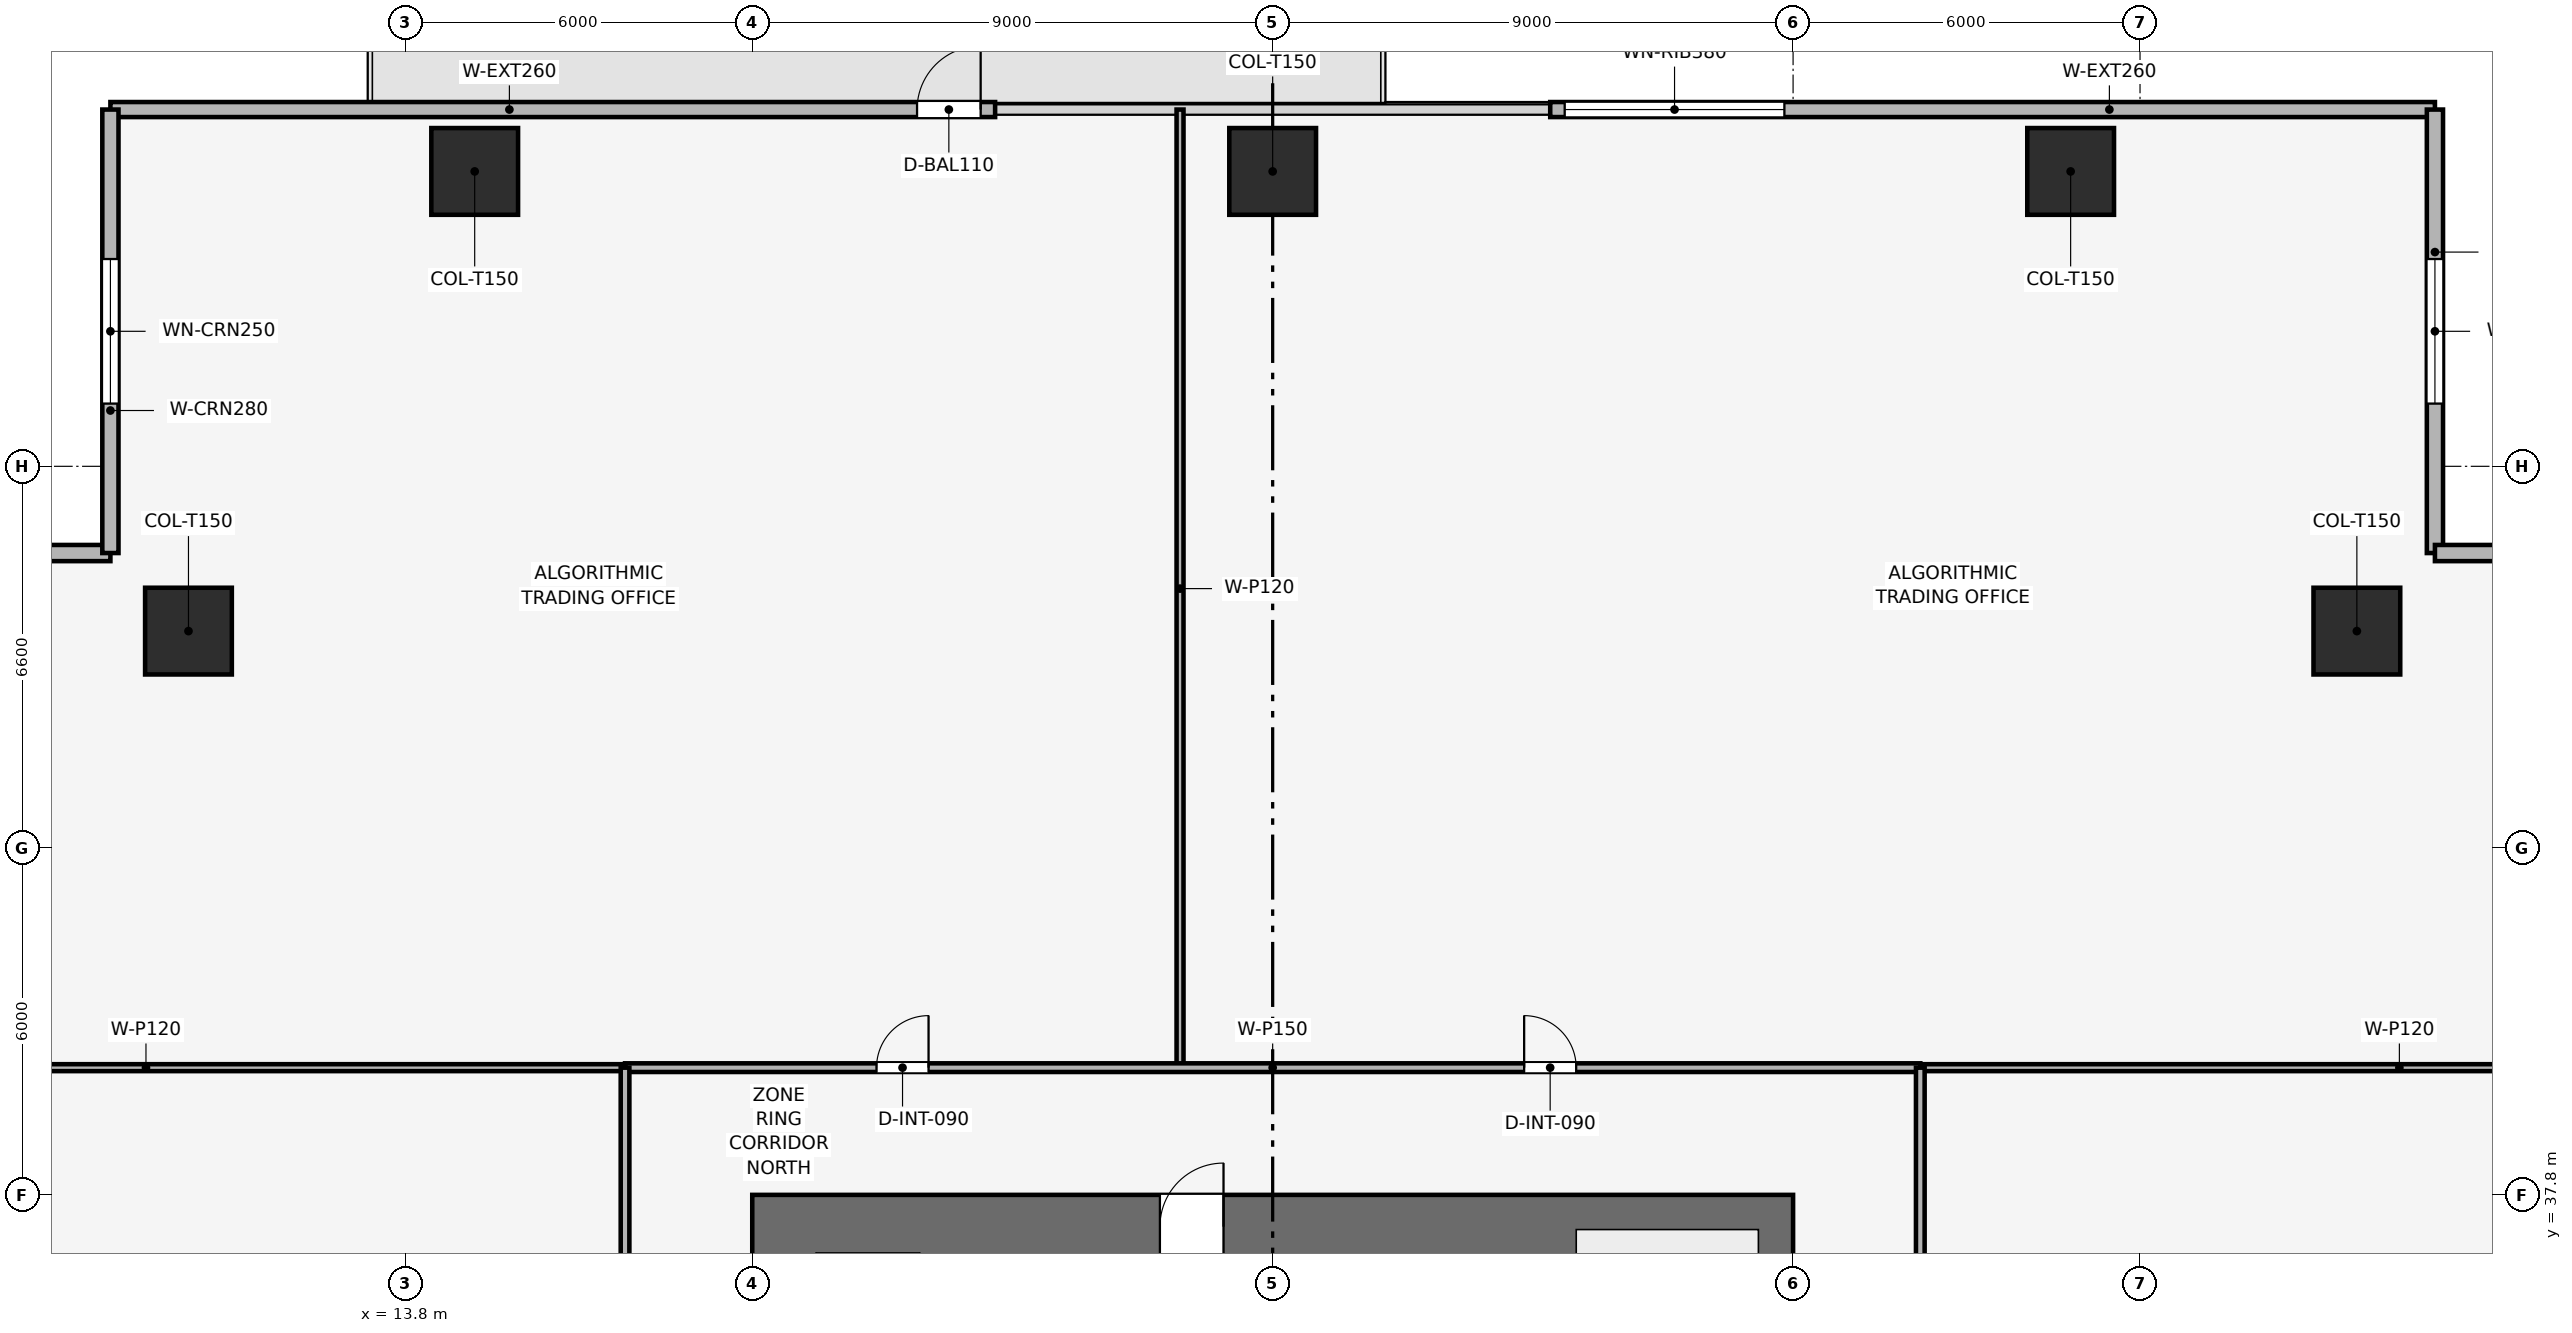
"""IFC4 building model, lengths in metres.
Left out: names, types, materials, properties, quantities, classifications, styles, units other than length and angle.
Written with IfcOpenShell. Run it as: python <this file> out.ifc"""

import sys

from ifc_helpers import new_model, si_unit, direction, frame, frame_2d, origin, origin_2d, place, context, subcontext, project, spatial, rectangle, extrude, element, fill, save


model = new_model("IFC4")
c1 = context("Model", 3, precision=1e-05, world=origin(), true_north=direction((0.0, 1.0)))
c2 = subcontext(c1, "Body", "Model", "MODEL_VIEW")
j1 = project(units=[si_unit("LENGTHUNIT", "METRE"), si_unit("PLANEANGLEUNIT", "RADIAN")], contexts=[c1])
p1 = place(None, origin())
s1 = spatial("IfcSite", under=j1, at=p1, CompositionType="ELEMENT")
p2 = place(p1, origin())
s2 = spatial("IfcBuilding", under=s1, at=p2, CompositionType="ELEMENT")
p3 = place(p2, frame((0.0, 0.0, 57.3)))
s3 = spatial("IfcBuildingStorey", under=s2, at=p3, CompositionType="ELEMENT", Elevation=57.3)
p4 = place(p3, frame((19.8, 37.25, 0.0), z_axis=(0.0, 0.0, 1.0), x_axis=(1.0, 0.0, 0.0)))
e1 = element("IfcWall", 1, at=p4, inside=s3, PredefinedType="SHEAR", context=c2, shape_type="SweptSolid", body=[
    extrude(rectangle(XDim=18.0, YDim=1.1, at=frame_2d((9.0, 0.0))), origin(), (0.0, 0.0, 1.0), 3.9),
])
p5 = place(p4, frame((7.05, 0.0, 0.0)))
e2 = element("IfcOpeningElement", 2, at=p5, cuts=e1, PredefinedType="OPENING", context=c2, shape_type="SweptSolid", body=[
    extrude(rectangle(XDim=1.1, YDim=2.15, at=frame_2d((0.55, 1.075))), frame((0.0, 0.56, 0.0), z_axis=(0.0, -1.0, 0.0), x_axis=(1.0, 0.0, 0.0)), (0.0, 0.0, 1.0), 1.12),
])
for number, where, z_axis, x_axis in (
    (3, (42.6, 55.5, 0.003), (0.0, 0.0, 1.0), (1.0, 0.0, 0.0)),
    (4, (28.8, 55.5, 0.003), (0.0, 0.0, 1.0), (1.0, 0.0, 0.0)),
    (5, (15.0, 55.5, 0.003), (0.0, 0.0, 1.0), (1.0, 0.0, 0.0)),
    (6, (47.55, 47.55, 0.003), (0.0, 0.0, 1.0), (1.0, 0.0, 0.0)),
    (7, (10.05, 47.55, 0.003), (0.0, 0.0, 1.0), (1.0, 0.0, 0.0)),
):
    element("IfcColumn", number, at=place(p3, frame(where, z_axis=z_axis, x_axis=x_axis)), inside=s3, PredefinedType="COLUMN", context=c2, shape_type="SweptSolid", body=[
        extrude(rectangle(XDim=1.5, YDim=1.5, at=origin_2d()), origin(), (0.0, 0.0, 1.0), 3.644),
    ])
p6 = place(p3, frame((8.7, 56.57, 0.0), z_axis=(0.0, 0.0, 1.0), x_axis=(1.0, 0.0, 0.0)))
e8 = element("IfcWall", 8, at=p6, inside=s3, PredefinedType="SOLIDWALL", context=c2, shape_type="SweptSolid", body=[
    extrude(rectangle(XDim=15.3, YDim=0.26, at=frame_2d((7.65, 0.0))), origin(), (0.0, 0.0, 1.0), 3.65),
])
p7 = place(p6, frame((13.95, 0.0, 0.0)))
e9 = element("IfcOpeningElement", 9, at=p7, cuts=e8, PredefinedType="OPENING", context=c2, shape_type="SweptSolid", body=[
    extrude(rectangle(XDim=1.1, YDim=2.2, at=frame_2d((0.55, 1.1))), frame((0.0, 0.14, 0.0), z_axis=(0.0, -1.0, 0.0), x_axis=(1.0, 0.0, 0.0)), (0.0, 0.0, 1.0), 0.28),
])
p8 = place(p3, frame((33.6, 56.57, 0.0), z_axis=(0.0, 0.0, 1.0), x_axis=(1.0, 0.0, 0.0)))
e10 = element("IfcWall", 10, at=p8, inside=s3, PredefinedType="SOLIDWALL", context=c2, shape_type="SweptSolid", body=[
    extrude(rectangle(XDim=15.3, YDim=0.26, at=frame_2d((7.65, 0.0))), origin(), (0.0, 0.0, 1.0), 3.65),
])
p9 = place(p8, frame((0.25, 0.0, 0.9)))
e11 = element("IfcOpeningElement", 11, at=p9, cuts=e10, PredefinedType="OPENING", context=c2, shape_type="SweptSolid", body=[
    extrude(rectangle(XDim=3.8, YDim=1.9, at=frame_2d((1.9, 0.95))), frame((0.0, 0.14, 0.0), z_axis=(0.0, -1.0, 0.0), x_axis=(1.0, 0.0, 0.0)), (0.0, 0.0, 1.0), 0.28),
])
p10 = place(p3, frame((1.03, 48.9, 0.0), z_axis=(0.0, 0.0, 1.0), x_axis=(1.0, 0.0, 0.0)))
e12 = element("IfcWall", 12, at=p10, inside=s3, PredefinedType="SOLIDWALL", context=c2, shape_type="SweptSolid", body=[
    extrude(rectangle(XDim=7.67, YDim=0.28, at=frame_2d((3.835, 0.0))), origin(), (0.0, 0.0, 1.0), 3.65),
])
p11 = place(p10, frame((2.585, 0.0, 0.9)))
e13 = element("IfcOpeningElement", 13, at=p11, cuts=e12, PredefinedType="OPENING", context=c2, shape_type="SweptSolid", body=[
    extrude(rectangle(XDim=2.5, YDim=1.9, at=frame_2d((1.25, 0.95))), frame((0.0, 0.15, 0.0), z_axis=(0.0, -1.0, 0.0), x_axis=(1.0, 0.0, 0.0)), (0.0, 0.0, 1.0), 0.3),
])
p12 = place(p3, frame((8.7, 48.9, 0.0), z_axis=(0.0, 0.0, 1.0), x_axis=(0.0, 1.0, 0.0)))
e14 = element("IfcWall", 14, at=p12, inside=s3, PredefinedType="SOLIDWALL", context=c2, shape_type="SweptSolid", body=[
    extrude(rectangle(XDim=7.67, YDim=0.28, at=frame_2d((3.835, 0.0))), origin(), (0.0, 0.0, 1.0), 3.65),
])
p13 = place(p12, frame((2.585, 0.0, 0.9)))
e15 = element("IfcOpeningElement", 15, at=p13, cuts=e14, PredefinedType="OPENING", context=c2, shape_type="SweptSolid", body=[
    extrude(rectangle(XDim=2.5, YDim=1.9, at=frame_2d((1.25, 0.95))), frame((0.0, 0.15, 0.0), z_axis=(0.0, -1.0, 0.0), x_axis=(1.0, 0.0, 0.0)), (0.0, 0.0, 1.0), 0.3),
])
p14 = place(p3, frame((48.9, 56.57, 0.0), z_axis=(0.0, 0.0, 1.0), x_axis=(0.0, -1.0, 0.0)))
e16 = element("IfcWall", 16, at=p14, inside=s3, PredefinedType="SOLIDWALL", context=c2, shape_type="SweptSolid", body=[
    extrude(rectangle(XDim=7.67, YDim=0.28, at=frame_2d((3.835, 0.0))), origin(), (0.0, 0.0, 1.0), 3.65),
])
p15 = place(p14, frame((2.585, 0.0, 0.9)))
e17 = element("IfcOpeningElement", 17, at=p15, cuts=e16, PredefinedType="OPENING", context=c2, shape_type="SweptSolid", body=[
    extrude(rectangle(XDim=2.5, YDim=1.9, at=frame_2d((1.25, 0.95))), frame((0.0, 0.15, 0.0), z_axis=(0.0, -1.0, 0.0), x_axis=(1.0, 0.0, 0.0)), (0.0, 0.0, 1.0), 0.3),
])
p16 = place(p3, frame((48.9, 48.9, 0.0), z_axis=(0.0, 0.0, 1.0), x_axis=(1.0, 0.0, 0.0)))
e18 = element("IfcWall", 18, at=p16, inside=s3, PredefinedType="SOLIDWALL", context=c2, shape_type="SweptSolid", body=[
    extrude(rectangle(XDim=7.67, YDim=0.28, at=frame_2d((3.835, 0.0))), origin(), (0.0, 0.0, 1.0), 3.65),
])
p17 = place(p16, frame((2.585, 0.0, 0.9)))
e19 = element("IfcOpeningElement", 19, at=p17, cuts=e18, PredefinedType="OPENING", context=c2, shape_type="SweptSolid", body=[
    extrude(rectangle(XDim=2.5, YDim=1.9, at=frame_2d((1.25, 0.95))), frame((0.0, 0.15, 0.0), z_axis=(0.0, -1.0, 0.0), x_axis=(1.0, 0.0, 0.0)), (0.0, 0.0, 1.0), 0.3),
])
for number, where, z_axis, x_axis in (
    (20, (27.198, 40.0, 0.0), (0.0, 0.0, 1.0), (0.0, 1.0, 0.0)),
    (21, (1.03, 40.0, 0.0), (0.0, 0.0, 1.0), (1.0, 0.0, 0.0)),
    (22, (40.0, 40.0, 0.0), (0.0, 0.0, 1.0), (1.0, 0.0, 0.0)),
):
    element("IfcWall", number, at=place(p3, frame(where, z_axis=z_axis, x_axis=x_axis)), inside=s3, PredefinedType="PARTITIONING", context=c2, shape_type="SweptSolid", body=[
        extrude(rectangle(XDim=16.57, YDim=0.12, at=frame_2d((8.285, 0.0))), origin(), (0.0, 0.0, 1.0), 2.935),
    ])
p18 = place(p3, frame((17.6, 40.0, 0.0), z_axis=(0.0, 0.0, 1.0), x_axis=(1.0, 0.0, 0.0)))
e23 = element("IfcWall", 23, at=p18, inside=s3, PredefinedType="PARTITIONING", context=c2, shape_type="SweptSolid", body=[
    extrude(rectangle(XDim=22.4, YDim=0.15, at=frame_2d((11.2, 0.0))), origin(), (0.0, 0.0, 1.0), 3.085),
])
p19 = place(p18, frame((4.349, 0.0, 0.0)))
e24 = element("IfcOpeningElement", 24, at=p19, cuts=e23, PredefinedType="OPENING", context=c2, shape_type="SweptSolid", body=[
    extrude(rectangle(XDim=0.9, YDim=2.1, at=frame_2d((0.45, 1.05))), frame((0.0, 0.085, 0.0), z_axis=(0.0, -1.0, 0.0), x_axis=(1.0, 0.0, 0.0)), (0.0, 0.0, 1.0), 0.17),
])
p20 = place(p18, frame((15.549, 0.0, 0.0)))
e25 = element("IfcOpeningElement", 25, at=p20, cuts=e23, PredefinedType="OPENING", context=c2, shape_type="SweptSolid", body=[
    extrude(rectangle(XDim=0.9, YDim=2.1, at=frame_2d((0.45, 1.05))), frame((0.0, 0.085, 0.0), z_axis=(0.0, -1.0, 0.0), x_axis=(1.0, 0.0, 0.0)), (0.0, 0.0, 1.0), 0.17),
])
p21 = place(p3, frame((17.6, 17.6, 0.0), z_axis=(0.0, 0.0, 1.0), x_axis=(0.0, 1.0, 0.0)))
e26 = element("IfcWall", 26, at=p21, inside=s3, PredefinedType="PARTITIONING", context=c2, shape_type="SweptSolid", body=[
    extrude(rectangle(XDim=22.4, YDim=0.15, at=frame_2d((11.2, 0.0))), origin(), (0.0, 0.0, 1.0), 3.085),
])
p22 = place(p21, frame((0.85, 0.0, 0.0)))
e27 = element("IfcOpeningElement", 27, at=p22, cuts=e26, PredefinedType="OPENING", context=c2, shape_type="SweptSolid", body=[
    extrude(rectangle(XDim=0.9, YDim=2.1, at=frame_2d((0.45, 1.05))), frame((0.0, 0.085, 0.0), z_axis=(0.0, -1.0, 0.0), x_axis=(1.0, 0.0, 0.0)), (0.0, 0.0, 1.0), 0.17),
])
p23 = place(p21, frame((3.55, 0.0, 0.0)))
e28 = element("IfcOpeningElement", 28, at=p23, cuts=e26, PredefinedType="OPENING", context=c2, shape_type="SweptSolid", body=[
    extrude(rectangle(XDim=0.9, YDim=2.1, at=frame_2d((0.45, 1.05))), frame((0.0, 0.085, 0.0), z_axis=(0.0, -1.0, 0.0), x_axis=(1.0, 0.0, 0.0)), (0.0, 0.0, 1.0), 0.17),
])
p24 = place(p21, frame((6.45, 0.0, 0.0)))
e29 = element("IfcOpeningElement", 29, at=p24, cuts=e26, PredefinedType="OPENING", context=c2, shape_type="SweptSolid", body=[
    extrude(rectangle(XDim=0.9, YDim=2.1, at=frame_2d((0.45, 1.05))), frame((0.0, 0.085, 0.0), z_axis=(0.0, -1.0, 0.0), x_axis=(1.0, 0.0, 0.0)), (0.0, 0.0, 1.0), 0.17),
])
p25 = place(p21, frame((9.2, 0.0, 0.0)))
e30 = element("IfcOpeningElement", 30, at=p25, cuts=e26, PredefinedType="OPENING", context=c2, shape_type="SweptSolid", body=[
    extrude(rectangle(XDim=0.95, YDim=2.1, at=frame_2d((0.475, 1.05))), frame((0.0, 0.085, 0.0), z_axis=(0.0, -1.0, 0.0), x_axis=(1.0, 0.0, 0.0)), (0.0, 0.0, 1.0), 0.17),
])
p26 = place(p21, frame((16.25, 0.0, 0.0)))
e31 = element("IfcOpeningElement", 31, at=p26, cuts=e26, PredefinedType="OPENING", context=c2, shape_type="SweptSolid", body=[
    extrude(rectangle(XDim=0.9, YDim=2.1, at=frame_2d((0.45, 1.05))), frame((0.0, 0.085, 0.0), z_axis=(0.0, -1.0, 0.0), x_axis=(1.0, 0.0, 0.0)), (0.0, 0.0, 1.0), 0.17),
])
p27 = place(p3, frame((40.0, 17.6, 0.0), z_axis=(0.0, 0.0, 1.0), x_axis=(0.0, 1.0, 0.0)))
e32 = element("IfcWall", 32, at=p27, inside=s3, PredefinedType="PARTITIONING", context=c2, shape_type="SweptSolid", body=[
    extrude(rectangle(XDim=22.4, YDim=0.15, at=frame_2d((11.2, 0.0))), origin(), (0.0, 0.0, 1.0), 3.085),
])
p28 = place(p27, frame((0.7, 0.0, 0.0)))
e33 = element("IfcOpeningElement", 33, at=p28, cuts=e32, PredefinedType="OPENING", context=c2, shape_type="SweptSolid", body=[
    extrude(rectangle(XDim=0.9, YDim=2.1, at=frame_2d((0.45, 1.05))), frame((0.0, 0.085, 0.0), z_axis=(0.0, -1.0, 0.0), x_axis=(1.0, 0.0, 0.0)), (0.0, 0.0, 1.0), 0.17),
])
p29 = place(p27, frame((6.404, 0.0, 0.0)))
e34 = element("IfcOpeningElement", 34, at=p29, cuts=e32, PredefinedType="OPENING", context=c2, shape_type="SweptSolid", body=[
    extrude(rectangle(XDim=0.9, YDim=2.1, at=frame_2d((0.45, 1.05))), frame((0.0, 0.085, 0.0), z_axis=(0.0, -1.0, 0.0), x_axis=(1.0, 0.0, 0.0)), (0.0, 0.0, 1.0), 0.17),
])
p30 = place(p27, frame((16.454, 0.0, 0.0)))
e35 = element("IfcOpeningElement", 35, at=p30, cuts=e32, PredefinedType="OPENING", context=c2, shape_type="SweptSolid", body=[
    extrude(rectangle(XDim=0.9, YDim=2.1, at=frame_2d((0.45, 1.05))), frame((0.0, 0.085, 0.0), z_axis=(0.0, -1.0, 0.0), x_axis=(1.0, 0.0, 0.0)), (0.0, 0.0, 1.0), 0.17),
])
p31 = place(p7, origin())
e36 = element("IfcDoor", 36, at=p31, inside=s3, OperationType="SINGLE_SWING_RIGHT", PredefinedType="DOOR", context=c2, shape_type="SweptSolid", body=[
    extrude(rectangle(XDim=1.1, YDim=2.2, at=frame_2d((0.55, 1.1))), frame((0.0, 0.025, 0.0), z_axis=(0.0, -1.0, 0.0), x_axis=(1.0, 0.0, 0.0)), (0.0, 0.0, 1.0), 0.05),
])
fill(e9, e36)
p32 = place(p9, origin())
e37 = element("IfcWindow", 37, at=p32, inside=s3, PartitioningType="SINGLE_PANEL", PredefinedType="WINDOW", context=c2, shape_type="SweptSolid", body=[
    extrude(rectangle(XDim=3.8, YDim=1.9, at=frame_2d((1.9, 0.95))), frame((0.0, 0.03, 0.0), z_axis=(0.0, -1.0, 0.0), x_axis=(1.0, 0.0, 0.0)), (0.0, 0.0, 1.0), 0.06),
])
fill(e11, e37)
p33 = place(p13, origin())
e38 = element("IfcWindow", 38, at=p33, inside=s3, PartitioningType="SINGLE_PANEL", PredefinedType="WINDOW", context=c2, shape_type="SweptSolid", body=[
    extrude(rectangle(XDim=2.5, YDim=1.9, at=frame_2d((1.25, 0.95))), frame((0.0, 0.03, 0.0), z_axis=(0.0, -1.0, 0.0), x_axis=(1.0, 0.0, 0.0)), (0.0, 0.0, 1.0), 0.06),
])
fill(e15, e38)
p34 = place(p15, origin())
e39 = element("IfcWindow", 39, at=p34, inside=s3, PartitioningType="SINGLE_PANEL", PredefinedType="WINDOW", context=c2, shape_type="SweptSolid", body=[
    extrude(rectangle(XDim=2.5, YDim=1.9, at=frame_2d((1.25, 0.95))), frame((0.0, 0.03, 0.0), z_axis=(0.0, -1.0, 0.0), x_axis=(1.0, 0.0, 0.0)), (0.0, 0.0, 1.0), 0.06),
])
fill(e17, e39)
p35 = place(p19, origin())
e40 = element("IfcDoor", 40, at=p35, inside=s3, OperationType="SINGLE_SWING_RIGHT", PredefinedType="DOOR", context=c2, shape_type="SweptSolid", body=[
    extrude(rectangle(XDim=0.9, YDim=2.1, at=frame_2d((0.45, 1.05))), frame((0.0, 0.025, 0.0), z_axis=(0.0, -1.0, 0.0), x_axis=(1.0, 0.0, 0.0)), (0.0, 0.0, 1.0), 0.05),
])
fill(e24, e40)
p36 = place(p20, origin())
e41 = element("IfcDoor", 41, at=p36, inside=s3, OperationType="SINGLE_SWING_LEFT", PredefinedType="DOOR", context=c2, shape_type="SweptSolid", body=[
    extrude(rectangle(XDim=0.9, YDim=2.1, at=frame_2d((0.45, 1.05))), frame((0.0, 0.025, 0.0), z_axis=(0.0, -1.0, 0.0), x_axis=(1.0, 0.0, 0.0)), (0.0, 0.0, 1.0), 0.05),
])
fill(e25, e41)
p37 = place(p5, origin())
e42 = element("IfcDoor", 42, at=p37, inside=s3, OperationType="SINGLE_SWING_RIGHT", PredefinedType="DOOR", context=c2, shape_type="SweptSolid", body=[
    extrude(rectangle(XDim=1.1, YDim=2.15, at=frame_2d((0.55, 1.075))), frame((0.0, 0.025, 0.0), z_axis=(0.0, -1.0, 0.0), x_axis=(1.0, 0.0, 0.0)), (0.0, 0.0, 1.0), 0.05),
])
fill(e2, e42)
save(model, sys.argv[1])
